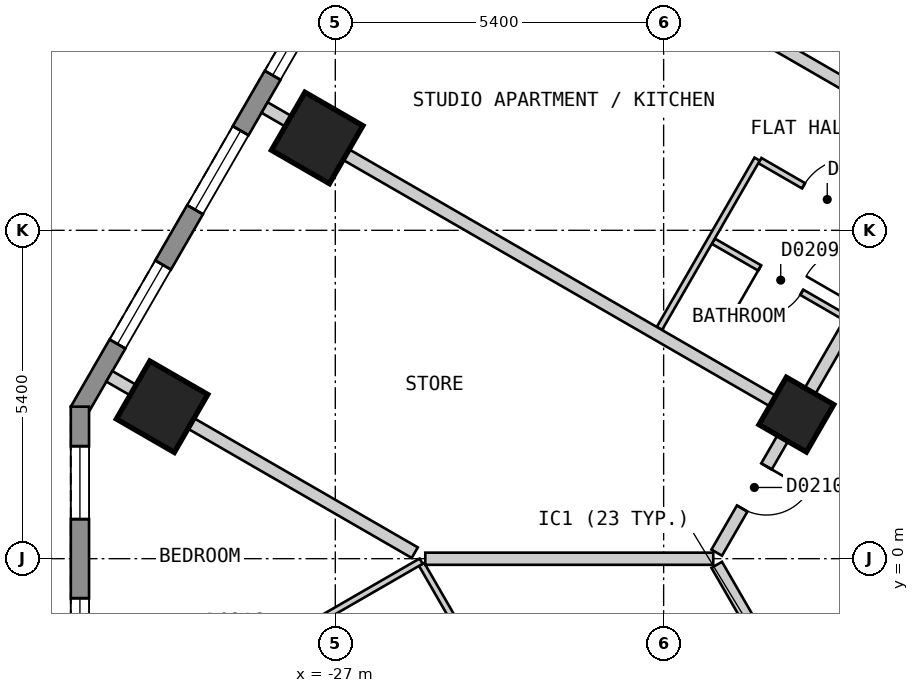
"""IFC4 building model, lengths in metres.
Left out: names, types, materials, properties, quantities, classifications, styles, units other than length and angle.
Written with IfcOpenShell. Run it as: python <this file> out.ifc"""

import sys

from ifc_helpers import new_model, si_unit, direction, frame, frame_2d, origin, origin_2d, place, context, subcontext, project, spatial, polyline, rectangle, outline, extrude, element, fill, save


model = new_model("IFC4")
c1 = context("Model", 3, precision=1e-05, world=origin(), true_north=direction((0.0, 1.0)))
c2 = subcontext(c1, "Body", "Model", "MODEL_VIEW")
j1 = project(units=[si_unit("LENGTHUNIT", "METRE"), si_unit("PLANEANGLEUNIT", "RADIAN")], contexts=[c1])
p1 = place(None, origin())
s1 = spatial("IfcSite", under=j1, at=p1, CompositionType="ELEMENT")
p2 = place(p1, origin())
s2 = spatial("IfcBuilding", under=s1, at=p2, CompositionType="ELEMENT")
p3 = place(p2, frame((0.0, 0.0, 41.4)))
s3 = spatial("IfcBuildingStorey", under=s2, at=p3, CompositionType="ELEMENT", Elevation=41.4)
for number, where, z_axis, x_axis in (
    (1, (-27.298, 6.919, 0.0), (0.0, 0.0, 1.0), (-0.5, -0.866, 0.0)),
    (2, (-29.849, 2.499, 0.0), (0.0, 0.0, 1.0), (-0.5, -0.866, 0.0)),
):
    element("IfcColumn", number, at=place(p3, frame(where, z_axis=z_axis, x_axis=x_axis)), inside=s3, PredefinedType="COLUMN", context=c2, shape_type="SweptSolid", body=[
        extrude(rectangle(XDim=1.1, YDim=1.1, at=origin_2d()), origin(), (0.0, 0.0, 1.0), 3.0),
    ])
p4 = place(p3, frame((-19.417, 2.369, 0.0), z_axis=(0.0, 0.0, 1.0), x_axis=(-0.499984884929, -0.866034130299, 0.0)))
e3 = element("IfcColumn", 3, at=p4, inside=s3, PredefinedType="COLUMN", context=c2, shape_type="SweptSolid", body=[
    extrude(rectangle(XDim=0.9, YDim=0.9, at=origin_2d()), origin(), (0.0, 0.0, 1.0), 3.0),
])
p5 = place(p3, frame((-17.71, 25.825, 0.0), z_axis=(0.0, 0.0, 1.0), x_axis=(-0.500001938803, -0.866024284413, 0.0)))
e4 = element("IfcWall", 4, at=p5, inside=s3, PredefinedType="SOLIDWALL", context=c2, shape_type="SweptSolid", body=[
    extrude(outline(polyline([(0.0, -0.15), (27.02, -0.15), (26.94, 0.15), (0.08, 0.15), (0.0, -0.15)])), origin(), (0.0, 0.0, 1.0), 2.7),
])
p6 = place(p5, frame((1.277, 0.0, 0.15)))
e5 = element("IfcOpeningElement", 5, at=p6, cuts=e4, PredefinedType="OPENING", context=c2, shape_type="SweptSolid", body=[
    extrude(rectangle(XDim=1.5, YDim=2.1, at=frame_2d((0.75, 1.05))), frame((0.0, 0.16, 0.0), z_axis=(0.0, -1.0, 0.0), x_axis=(1.0, 0.0, 0.0)), (0.0, 0.0, 1.0), 0.32),
])
p7 = place(p5, frame((3.829, 0.0, 0.15)))
e6 = element("IfcOpeningElement", 6, at=p7, cuts=e4, PredefinedType="OPENING", context=c2, shape_type="SweptSolid", body=[
    extrude(rectangle(XDim=1.5, YDim=2.1, at=frame_2d((0.75, 1.05))), frame((0.0, 0.16, 0.0), z_axis=(0.0, -1.0, 0.0), x_axis=(1.0, 0.0, 0.0)), (0.0, 0.0, 1.0), 0.32),
])
p8 = place(p5, frame((6.382, 0.0, 0.15)))
e7 = element("IfcOpeningElement", 7, at=p8, cuts=e4, PredefinedType="OPENING", context=c2, shape_type="SweptSolid", body=[
    extrude(rectangle(XDim=1.5, YDim=2.1, at=frame_2d((0.75, 1.05))), frame((0.0, 0.16, 0.0), z_axis=(0.0, -1.0, 0.0), x_axis=(1.0, 0.0, 0.0)), (0.0, 0.0, 1.0), 0.32),
])
p9 = place(p5, frame((8.933, 0.0, 0.15)))
e8 = element("IfcOpeningElement", 8, at=p9, cuts=e4, PredefinedType="OPENING", context=c2, shape_type="SweptSolid", body=[
    extrude(rectangle(XDim=1.5, YDim=2.1, at=frame_2d((0.75, 1.05))), frame((0.0, 0.16, 0.0), z_axis=(0.0, -1.0, 0.0), x_axis=(1.0, 0.0, 0.0)), (0.0, 0.0, 1.0), 0.32),
])
p10 = place(p5, frame((11.485, 0.0, 0.15)))
e9 = element("IfcOpeningElement", 9, at=p10, cuts=e4, PredefinedType="OPENING", context=c2, shape_type="SweptSolid", body=[
    extrude(rectangle(XDim=1.5, YDim=2.1, at=frame_2d((0.75, 1.05))), frame((0.0, 0.16, 0.0), z_axis=(0.0, -1.0, 0.0), x_axis=(1.0, 0.0, 0.0)), (0.0, 0.0, 1.0), 0.32),
])
p11 = place(p5, frame((14.037, 0.0, 0.15)))
e10 = element("IfcOpeningElement", 10, at=p11, cuts=e4, PredefinedType="OPENING", context=c2, shape_type="SweptSolid", body=[
    extrude(rectangle(XDim=1.5, YDim=2.1, at=frame_2d((0.75, 1.05))), frame((0.0, 0.16, 0.0), z_axis=(0.0, -1.0, 0.0), x_axis=(1.0, 0.0, 0.0)), (0.0, 0.0, 1.0), 0.32),
])
p12 = place(p5, frame((16.589, 0.0, 0.15)))
e11 = element("IfcOpeningElement", 11, at=p12, cuts=e4, PredefinedType="OPENING", context=c2, shape_type="SweptSolid", body=[
    extrude(rectangle(XDim=1.5, YDim=2.1, at=frame_2d((0.75, 1.05))), frame((0.0, 0.16, 0.0), z_axis=(0.0, -1.0, 0.0), x_axis=(1.0, 0.0, 0.0)), (0.0, 0.0, 1.0), 0.32),
])
p13 = place(p5, frame((19.141, 0.0, 0.15)))
e12 = element("IfcOpeningElement", 12, at=p13, cuts=e4, PredefinedType="OPENING", context=c2, shape_type="SweptSolid", body=[
    extrude(rectangle(XDim=1.5, YDim=2.1, at=frame_2d((0.75, 1.05))), frame((0.0, 0.16, 0.0), z_axis=(0.0, -1.0, 0.0), x_axis=(1.0, 0.0, 0.0)), (0.0, 0.0, 1.0), 0.32),
])
p14 = place(p5, frame((21.693, 0.0, 0.15)))
e13 = element("IfcOpeningElement", 13, at=p14, cuts=e4, PredefinedType="OPENING", context=c2, shape_type="SweptSolid", body=[
    extrude(rectangle(XDim=1.5, YDim=2.1, at=frame_2d((0.75, 1.05))), frame((0.0, 0.16, 0.0), z_axis=(0.0, -1.0, 0.0), x_axis=(1.0, 0.0, 0.0)), (0.0, 0.0, 1.0), 0.32),
])
p15 = place(p5, frame((24.244, 0.0, 0.15)))
e14 = element("IfcOpeningElement", 14, at=p15, cuts=e4, PredefinedType="OPENING", context=c2, shape_type="SweptSolid", body=[
    extrude(rectangle(XDim=1.5, YDim=2.1, at=frame_2d((0.75, 1.05))), frame((0.0, 0.16, 0.0), z_axis=(0.0, -1.0, 0.0), x_axis=(1.0, 0.0, 0.0)), (0.0, 0.0, 1.0), 0.32),
])
p16 = place(p3, frame((-31.2, 2.5, 0.0), z_axis=(0.0, 0.0, 1.0), x_axis=(0.0, -1.0, 0.0)))
e15 = element("IfcWall", 15, at=p16, inside=s3, PredefinedType="SOLIDWALL", context=c2, shape_type="SweptSolid", body=[
    extrude(outline(polyline([(0.0, -0.15), (5.0, -0.15), (4.92, 0.15), (0.08, 0.15), (0.0, -0.15)])), origin(), (0.0, 0.0, 1.0), 2.7),
])
p17 = place(p16, frame((0.65, 0.0, 0.15)))
e16 = element("IfcOpeningElement", 16, at=p17, cuts=e15, PredefinedType="OPENING", context=c2, shape_type="SweptSolid", body=[
    extrude(rectangle(XDim=1.2, YDim=2.1, at=frame_2d((0.6, 1.05))), frame((0.0, 0.16, 0.0), z_axis=(0.0, -1.0, 0.0), x_axis=(1.0, 0.0, 0.0)), (0.0, 0.0, 1.0), 0.32),
])
p18 = place(p16, frame((3.15, 0.0, 0.15)))
e17 = element("IfcOpeningElement", 17, at=p18, cuts=e15, PredefinedType="OPENING", context=c2, shape_type="SweptSolid", body=[
    extrude(rectangle(XDim=1.2, YDim=2.1, at=frame_2d((0.6, 1.05))), frame((0.0, 0.16, 0.0), z_axis=(0.0, -1.0, 0.0), x_axis=(1.0, 0.0, 0.0)), (0.0, 0.0, 1.0), 0.32),
])
p19 = place(p3, frame((-20.727, -0.101, 0.0), z_axis=(0.0, 0.0, 1.0), x_axis=(0.500070814966, -0.865984514884, 0.0)))
e18 = element("IfcWall", 18, at=p19, inside=s3, PredefinedType="PARTITIONING", context=c2, shape_type="SweptSolid", body=[
    extrude(rectangle(XDim=7.239, YDim=0.2, at=frame_2d((3.62, 0.0))), origin(), (0.0, 0.0, 1.0), 2.7),
])
p20 = place(p19, frame((5.681, 0.0, 0.0)))
e19 = element("IfcOpeningElement", 19, at=p20, cuts=e18, PredefinedType="OPENING", context=c2, shape_type="SweptSolid", body=[
    extrude(rectangle(XDim=1.0, YDim=2.1, at=frame_2d((0.5, 1.05))), frame((0.0, 0.11, 0.0), z_axis=(0.0, -1.0, 0.0), x_axis=(1.0, 0.0, 0.0)), (0.0, 0.0, 1.0), 0.22),
])
p21 = place(p3, frame((-20.727, 0.099, 0.0), z_axis=(0.0, 0.0, 1.0), x_axis=(0.499993204491, 0.866029327138, 0.0)))
e20 = element("IfcWall", 20, at=p21, inside=s3, PredefinedType="PARTITIONING", context=c2, shape_type="SweptSolid", body=[
    extrude(rectangle(XDim=20.554, YDim=0.2, at=frame_2d((10.277, 0.0))), origin(), (0.0, 0.0, 1.0), 2.7),
])
p22 = place(p21, frame((14.88, 0.0, 0.0)))
e21 = element("IfcOpeningElement", 21, at=p22, cuts=e20, PredefinedType="OPENING", context=c2, shape_type="SweptSolid", body=[
    extrude(rectangle(XDim=1.0, YDim=2.1, at=frame_2d((0.5, 1.05))), frame((0.0, 0.11, 0.0), z_axis=(0.0, -1.0, 0.0), x_axis=(1.0, 0.0, 0.0)), (0.0, 0.0, 1.0), 0.22),
])
p23 = place(p21, frame((4.673, 0.0, 0.0)))
e22 = element("IfcOpeningElement", 22, at=p23, cuts=e20, PredefinedType="OPENING", context=c2, shape_type="SweptSolid", body=[
    extrude(rectangle(XDim=1.0, YDim=2.1, at=frame_2d((0.5, 1.05))), frame((0.0, 0.11, 0.0), z_axis=(0.0, -1.0, 0.0), x_axis=(1.0, 0.0, 0.0)), (0.0, 0.0, 1.0), 0.22),
])
p24 = place(p21, frame((0.838, 0.0, 0.0)))
e23 = element("IfcOpeningElement", 23, at=p24, cuts=e20, PredefinedType="OPENING", context=c2, shape_type="SweptSolid", body=[
    extrude(rectangle(XDim=0.8, YDim=2.1, at=frame_2d((0.4, 1.05))), frame((0.0, 0.11, 0.0), z_axis=(0.0, -1.0, 0.0), x_axis=(1.0, 0.0, 0.0)), (0.0, 0.0, 1.0), 0.22),
])
p25 = place(p3, frame((-25.58, -0.094, 0.0), z_axis=(0.0, 0.0, 1.0), x_axis=(0.500093258202, -0.865971554441, 0.0)))
e24 = element("IfcWall", 24, at=p25, inside=s3, PredefinedType="PARTITIONING", context=c2, shape_type="SweptSolid", body=[
    extrude(rectangle(XDim=5.053, YDim=0.1, at=frame_2d((2.527, 0.0))), origin(), (0.0, 0.0, 1.0), 2.7),
])
p26 = place(p25, frame((2.102, 0.0, 0.0)))
e25 = element("IfcOpeningElement", 25, at=p26, cuts=e24, PredefinedType="OPENING", context=c2, shape_type="SweptSolid", body=[
    extrude(rectangle(XDim=0.8, YDim=2.1, at=frame_2d((0.4, 1.05))), frame((0.0, 0.06, 0.0), z_axis=(0.0, -1.0, 0.0), x_axis=(1.0, 0.0, 0.0)), (0.0, 0.0, 1.0), 0.12),
])
p27 = place(p3, frame((-20.017, 6.547, 0.0), z_axis=(0.0, 0.0, 1.0), x_axis=(0.865940918122, -0.500146304917, 0.0)))
e26 = element("IfcWall", 26, at=p27, inside=s3, PredefinedType="PARTITIONING", context=c2, shape_type="SweptSolid", body=[
    extrude(rectangle(XDim=2.51, YDim=0.1, at=frame_2d((1.255, 0.0))), origin(), (0.0, 0.0, 1.0), 2.7),
])
p28 = place(p27, frame((0.829, 0.0, 0.0)))
e27 = element("IfcOpeningElement", 27, at=p28, cuts=e26, PredefinedType="OPENING", context=c2, shape_type="SweptSolid", body=[
    extrude(rectangle(XDim=0.9, YDim=2.1, at=frame_2d((0.45, 1.05))), frame((0.0, 0.06, 0.0), z_axis=(0.0, -1.0, 0.0), x_axis=(1.0, 0.0, 0.0)), (0.0, 0.0, 1.0), 0.12),
])
p29 = place(p3, frame((-20.783, 5.221, 0.0), z_axis=(0.0, 0.0, 1.0), x_axis=(0.865958718457, -0.500115484592, 0.0)))
e28 = element("IfcWall", 28, at=p29, inside=s3, PredefinedType="PARTITIONING", context=c2, shape_type="SweptSolid", body=[
    extrude(rectangle(XDim=2.509, YDim=0.1, at=frame_2d((1.255, 0.0))), origin(), (0.0, 0.0, 1.0), 2.7),
])
p30 = place(p29, frame((0.88, 0.0, 0.0)))
e29 = element("IfcOpeningElement", 29, at=p30, cuts=e28, PredefinedType="OPENING", context=c2, shape_type="SweptSolid", body=[
    extrude(rectangle(XDim=0.8, YDim=2.1, at=frame_2d((0.4, 1.05))), frame((0.0, 0.06, 0.0), z_axis=(0.0, -1.0, 0.0), x_axis=(1.0, 0.0, 0.0)), (0.0, 0.0, 1.0), 0.12),
])
p31 = place(p3, frame((-21.669, 3.787, 0.0), z_axis=(0.0, 0.0, 1.0), x_axis=(0.499913121084, 0.86607555754, 0.0)))
e30 = element("IfcWall", 30, at=p31, inside=s3, PredefinedType="PARTITIONING", context=c2, shape_type="SweptSolid", body=[
    extrude(rectangle(XDim=3.214, YDim=0.1, at=frame_2d((1.607, 0.0))), origin(), (0.0, 0.0, 1.0), 2.7),
])
p32 = place(p3, frame((-30.715, -3.0, 0.0), z_axis=(0.0, 0.0, 1.0), x_axis=(0.866113484451, 0.499847408768, 0.0)))
e31 = element("IfcWall", 31, at=p32, inside=s3, PredefinedType="PARTITIONING", context=c2, shape_type="SweptSolid", body=[
    extrude(rectangle(XDim=5.92, YDim=0.1, at=frame_2d((2.96, 0.0))), origin(), (0.0, 0.0, 1.0), 2.7),
])
p33 = place(p32, frame((2.51, 0.0, 0.0)))
e32 = element("IfcOpeningElement", 32, at=p33, cuts=e31, PredefinedType="OPENING", context=c2, shape_type="SweptSolid", body=[
    extrude(rectangle(XDim=0.9, YDim=2.1, at=frame_2d((0.45, 1.05))), frame((0.0, 0.06, 0.0), z_axis=(0.0, -1.0, 0.0), x_axis=(1.0, 0.0, 0.0)), (0.0, 0.0, 1.0), 0.12),
])
p34 = place(p3, frame((-28.163, 7.419, 0.0), z_axis=(0.0, 0.0, 1.0), x_axis=(0.866022959057, -0.500004234368, 0.0)))
e33 = element("IfcWall", 33, at=p34, inside=s3, PredefinedType="PARTITIONING", context=c2, shape_type="SweptSolid", body=[
    extrude(rectangle(XDim=10.0, YDim=0.2, at=frame_2d((5.0, 0.0))), origin(), (0.0, 0.0, 1.0), 2.7),
])
p35 = place(p3, frame((-30.716, 2.999, 0.0), z_axis=(0.0, 0.0, 1.0), x_axis=(0.866032775405, -0.499987231761, 0.0)))
e34 = element("IfcWall", 34, at=p35, inside=s3, PredefinedType="PARTITIONING", context=c2, shape_type="SweptSolid", body=[
    extrude(rectangle(XDim=5.8, YDim=0.2, at=frame_2d((2.9, 0.0))), origin(), (0.0, 0.0, 1.0), 2.7),
])
p36 = place(p3, frame((-25.611, 11.839, 0.0), z_axis=(0.0, 0.0, 1.0), x_axis=(0.866022959057, -0.500004234368, 0.0)))
e35 = element("IfcWall", 35, at=p36, inside=s3, PredefinedType="PARTITIONING", context=c2, shape_type="SweptSolid", body=[
    extrude(rectangle(XDim=10.0, YDim=0.2, at=frame_2d((5.0, 0.0))), origin(), (0.0, 0.0, 1.0), 2.7),
])
p37 = place(p3, frame((-25.52, -0.001, 0.0), z_axis=(0.0, 0.0, 1.0), x_axis=(1.0, 0.0, 0.0)))
e36 = element("IfcWall", 36, at=p37, inside=s3, PredefinedType="PARTITIONING", context=c2, shape_type="SweptSolid", body=[
    extrude(rectangle(XDim=4.736, YDim=0.2, at=frame_2d((2.368, 0.0))), origin(), (0.0, 0.0, 1.0), 2.7),
])
p38 = place(p13, origin())
e37 = element("IfcWindow", 37, at=p38, inside=s3, PartitioningType="SINGLE_PANEL", PredefinedType="WINDOW", context=c2, shape_type="SweptSolid", body=[
    extrude(rectangle(XDim=1.5, YDim=2.1, at=frame_2d((0.75, 1.05))), frame((0.0, 0.03, 0.0), z_axis=(0.0, -1.0, 0.0), x_axis=(1.0, 0.0, 0.0)), (0.0, 0.0, 1.0), 0.06),
])
fill(e12, e37)
p39 = place(p14, origin())
e38 = element("IfcWindow", 38, at=p39, inside=s3, PartitioningType="SINGLE_PANEL", PredefinedType="WINDOW", context=c2, shape_type="SweptSolid", body=[
    extrude(rectangle(XDim=1.5, YDim=2.1, at=frame_2d((0.75, 1.05))), frame((0.0, 0.03, 0.0), z_axis=(0.0, -1.0, 0.0), x_axis=(1.0, 0.0, 0.0)), (0.0, 0.0, 1.0), 0.06),
])
fill(e13, e38)
p40 = place(p15, origin())
e39 = element("IfcWindow", 39, at=p40, inside=s3, PartitioningType="SINGLE_PANEL", PredefinedType="WINDOW", context=c2, shape_type="SweptSolid", body=[
    extrude(rectangle(XDim=1.5, YDim=2.1, at=frame_2d((0.75, 1.05))), frame((0.0, 0.03, 0.0), z_axis=(0.0, -1.0, 0.0), x_axis=(1.0, 0.0, 0.0)), (0.0, 0.0, 1.0), 0.06),
])
fill(e14, e39)
p41 = place(p17, origin())
e40 = element("IfcWindow", 40, at=p41, inside=s3, PartitioningType="SINGLE_PANEL", PredefinedType="WINDOW", context=c2, shape_type="SweptSolid", body=[
    extrude(rectangle(XDim=1.2, YDim=2.1, at=frame_2d((0.6, 1.05))), frame((0.0, 0.03, 0.0), z_axis=(0.0, -1.0, 0.0), x_axis=(1.0, 0.0, 0.0)), (0.0, 0.0, 1.0), 0.06),
])
fill(e16, e40)
p42 = place(p18, origin())
e41 = element("IfcWindow", 41, at=p42, inside=s3, PartitioningType="SINGLE_PANEL", PredefinedType="WINDOW", context=c2, shape_type="SweptSolid", body=[
    extrude(rectangle(XDim=1.2, YDim=2.1, at=frame_2d((0.6, 1.05))), frame((0.0, 0.03, 0.0), z_axis=(0.0, -1.0, 0.0), x_axis=(1.0, 0.0, 0.0)), (0.0, 0.0, 1.0), 0.06),
])
fill(e17, e41)
p43 = place(p28, origin())
e42 = element("IfcDoor", 42, at=p43, inside=s3, OperationType="SINGLE_SWING_RIGHT", PredefinedType="DOOR", context=c2, shape_type="SweptSolid", body=[
    extrude(rectangle(XDim=0.9, YDim=2.1, at=frame_2d((0.45, 1.05))), frame((0.0, 0.025, 0.0), z_axis=(0.0, -1.0, 0.0), x_axis=(1.0, 0.0, 0.0)), (0.0, 0.0, 1.0), 0.05),
])
fill(e27, e42)
p44 = place(p30, origin())
e43 = element("IfcDoor", 43, at=p44, inside=s3, OperationType="SINGLE_SWING_LEFT", PredefinedType="DOOR", context=c2, shape_type="SweptSolid", body=[
    extrude(rectangle(XDim=0.8, YDim=2.1, at=frame_2d((0.4, 1.05))), frame((0.0, 0.025, 0.0), z_axis=(0.0, -1.0, 0.0), x_axis=(1.0, 0.0, 0.0)), (0.0, 0.0, 1.0), 0.05),
])
fill(e29, e43)
p45 = place(p24, origin())
e44 = element("IfcDoor", 44, at=p45, inside=s3, OperationType="SINGLE_SWING_RIGHT", PredefinedType="DOOR", context=c2, shape_type="SweptSolid", body=[
    extrude(rectangle(XDim=0.8, YDim=2.1, at=frame_2d((0.4, 1.05))), frame((0.0, 0.025, 0.0), z_axis=(0.0, -1.0, 0.0), x_axis=(1.0, 0.0, 0.0)), (0.0, 0.0, 1.0), 0.05),
])
fill(e23, e44)
save(model, sys.argv[1])
